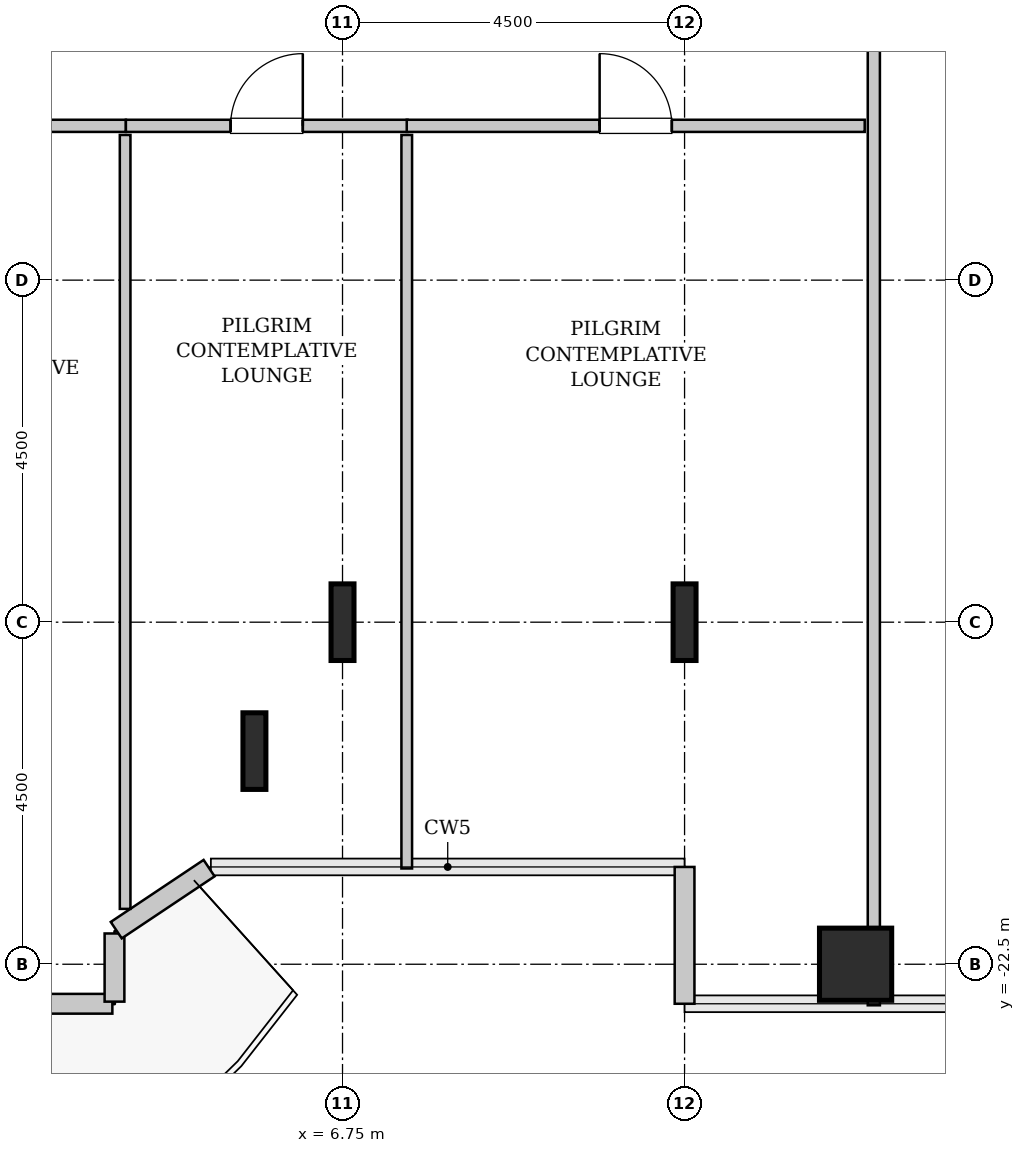
"""IFC4 building model, lengths in metres.
Left out: names, types, materials, properties, quantities, classifications, styles, units other than length and angle.
Written with IfcOpenShell. Run it as: python <this file> out.ifc"""

import sys

from ifc_helpers import new_model, si_unit, direction, frame, frame_2d, origin, origin_2d, place, context, subcontext, project, spatial, rectangle, hollow_rectangle, i_section, extrude, source, transform, mapped, element, fill, save


model = new_model("IFC4")
c1 = context("Model", 3, precision=1e-05, world=origin(), true_north=direction((0.0, 1.0)))
c2 = subcontext(c1, "Body", "Model", "MODEL_VIEW")
j1 = project(units=[si_unit("LENGTHUNIT", "METRE"), si_unit("PLANEANGLEUNIT", "RADIAN")], contexts=[c1])
p1 = place(None, origin())
s1 = spatial("IfcSite", under=j1, at=p1, CompositionType="ELEMENT")
p2 = place(p1, origin())
s2 = spatial("IfcBuilding", under=s1, at=p2, CompositionType="ELEMENT")
p3 = place(p2, frame((0.0, 0.0, 44.4)))
s3 = spatial("IfcBuildingStorey", under=s2, at=p3, CompositionType="ELEMENT", Elevation=44.4)
m1 = source(origin(), c2, "Body", "SweptSolid", [
    extrude(i_section(OverallWidth=0.302, OverallDepth=1.008, WebThickness=0.021, FlangeThickness=0.04, FilletRadius=0.03, at=origin_2d()), origin(), (0.0, 0.0, 1.0), 3.8),
])
for number, where, z_axis, x_axis in (
    (1, (5.591, -19.696, 0.0), (0.0, 0.0, 1.0), (1.0, 0.0, 0.0)),
    (2, (6.75, -18.0, 0.0), (0.0, 0.0, 1.0), (1.0, 0.0, 0.0)),
    (3, (11.25, -18.0, 0.0), (0.0, 0.0, 1.0), (1.0, 0.0, 0.0)),
):
    element("IfcColumn", number, at=place(p3, frame(where, z_axis=z_axis, x_axis=x_axis)), inside=s3, PredefinedType="COLUMN", context=c2, shape_type="MappedRepresentation", body=[
        mapped(m1, transform((0.0, 0.0, 0.0), x_axis=(1.0, 0.0, 0.0), y_axis=(0.0, 1.0, 0.0), z_axis=(0.0, 0.0, 1.0), scale=1.0)),
    ])
m2 = source(origin(), c2, "Body", "SweptSolid", [
    extrude(hollow_rectangle(XDim=0.95, YDim=0.95, WallThickness=0.045, InnerFilletRadius=0.045, OuterFilletRadius=0.09, at=origin_2d()), origin(), (0.0, 0.0, 1.0), 3.8),
])
p4 = place(p3, frame((13.5, -22.5, 0.0), z_axis=(0.0, 0.0, 1.0), x_axis=(1.0, 0.0, 0.0)))
e4 = element("IfcColumn", 4, at=p4, inside=s3, PredefinedType="COLUMN", context=c2, shape_type="MappedRepresentation", body=[
    mapped(m2, transform((0.0, 0.0, 0.0), x_axis=(1.0, 0.0, 0.0), y_axis=(0.0, 1.0, 0.0), z_axis=(0.0, 0.0, 1.0), scale=1.0)),
])
m3 = source(origin(), c2, "Body", "SweptSolid", [
    extrude(rectangle(XDim=1.8, YDim=0.26, at=frame_2d((0.9, 0.0))), origin(), (0.0, 0.0, 1.0), 3.55),
])
p5 = place(p3, frame((11.25, -21.22, 0.0), z_axis=(0.0, 0.0, 1.0), x_axis=(0.0, -1.0, 0.0)))
e5 = element("IfcWall", 5, at=p5, inside=s3, PredefinedType="SOLIDWALL", context=c2, shape_type="MappedRepresentation", body=[
    mapped(m3, transform((0.0, 0.0, 0.0), x_axis=(1.0, 0.0, 0.0), y_axis=(0.0, 1.0, 0.0), z_axis=(0.0, 0.0, 1.0), scale=1.0)),
])
m4 = source(origin(), c2, "Body", "SweptSolid", [
    extrude(rectangle(XDim=1.37, YDim=0.26, at=frame_2d((0.685, 0.0))), origin(), (0.0, 0.0, 1.0), 3.55),
])
p6 = place(p3, frame((2.352, -23.02, 0.0), z_axis=(0.0, 0.0, 1.0), x_axis=(1.0, 0.0, 0.0)))
e6 = element("IfcWall", 6, at=p6, inside=s3, PredefinedType="SOLIDWALL", context=c2, shape_type="MappedRepresentation", body=[
    mapped(m4, transform((0.0, 0.0, 0.0), x_axis=(1.0, 0.0, 0.0), y_axis=(0.0, 1.0, 0.0), z_axis=(0.0, 0.0, 1.0), scale=1.0)),
])
m5 = source(origin(), c2, "Body", "SweptSolid", [
    extrude(rectangle(XDim=0.897, YDim=0.26, at=frame_2d((0.448, 0.0))), origin(), (0.0, 0.0, 1.0), 3.55),
])
p7 = place(p3, frame((3.75, -22.992, 0.0), z_axis=(0.0, 0.0, 1.0), x_axis=(0.0, 1.0, 0.0)))
e7 = element("IfcWall", 7, at=p7, inside=s3, PredefinedType="SOLIDWALL", context=c2, shape_type="MappedRepresentation", body=[
    mapped(m5, transform((0.0, 0.0, 0.0), x_axis=(1.0, 0.0, 0.0), y_axis=(0.0, 1.0, 0.0), z_axis=(0.0, 0.0, 1.0), scale=1.0)),
])
m6 = source(origin(), c2, "Body", "SweptSolid", [
    extrude(rectangle(XDim=1.469, YDim=0.26, at=frame_2d((0.734, 0.0))), origin(), (0.0, 0.0, 1.0), 3.55),
])
p8 = place(p3, frame((3.773, -22.052, 0.0), z_axis=(0.0, 0.0, 1.0), x_axis=(0.831461760506, 0.555581983884, 0.0)))
e8 = element("IfcWall", 8, at=p8, inside=s3, PredefinedType="SOLIDWALL", context=c2, shape_type="MappedRepresentation", body=[
    mapped(m6, transform((0.0, 0.0, 0.0), x_axis=(1.0, 0.0, 0.0), y_axis=(0.0, 1.0, 0.0), z_axis=(0.0, 0.0, 1.0), scale=1.0)),
])
m7 = source(origin(), c2, "Body", "SweptSolid", [
    extrude(rectangle(XDim=15.845, YDim=0.16, at=frame_2d((7.922, 0.0))), origin(), (0.0, 0.0, 1.0), 3.535),
])
p9 = place(p3, frame((13.74, -23.04, 0.0), z_axis=(0.0, 0.0, 1.0), x_axis=(0.0, 1.0, 0.0)))
e9 = element("IfcWall", 9, at=p9, inside=s3, PredefinedType="PARTITIONING", context=c2, shape_type="MappedRepresentation", body=[
    mapped(m7, transform((0.0, 0.0, 0.0), x_axis=(1.0, 0.0, 0.0), y_axis=(0.0, 1.0, 0.0), z_axis=(0.0, 0.0, 1.0), scale=1.0)),
])
p10 = place(p9, frame((13.212, 0.0, 0.0)))
e10 = element("IfcOpeningElement", 10, at=p10, cuts=e9, PredefinedType="OPENING", context=c2, shape_type="SweptSolid", body=[
    extrude(rectangle(XDim=0.95, YDim=2.1, at=frame_2d((0.475, 1.05))), frame((0.0, 0.09, 0.0), z_axis=(0.0, -1.0, 0.0), x_axis=(1.0, 0.0, 0.0)), (0.0, 0.0, 1.0), 0.18),
])
m8 = source(origin(), c2, "Body", "SweptSolid", [
    extrude(rectangle(XDim=3.705, YDim=0.16, at=frame_2d((1.853, 0.0))), origin(), (0.0, 0.0, 1.0), 3.535),
])
p11 = place(p3, frame((0.195, -11.47, 0.0), z_axis=(0.0, 0.0, 1.0), x_axis=(1.0, 0.0, 0.0)))
e11 = element("IfcWall", 11, at=p11, inside=s3, PredefinedType="PARTITIONING", context=c2, shape_type="MappedRepresentation", body=[
    mapped(m8, transform((0.0, 0.0, 0.0), x_axis=(1.0, 0.0, 0.0), y_axis=(0.0, 1.0, 0.0), z_axis=(0.0, 0.0, 1.0), scale=1.0)),
])
p12 = place(p11, frame((1.377, 0.0, 0.0)))
e12 = element("IfcOpeningElement", 12, at=p12, cuts=e11, PredefinedType="OPENING", context=c2, shape_type="SweptSolid", body=[
    extrude(rectangle(XDim=0.95, YDim=2.1, at=frame_2d((0.475, 1.05))), frame((0.0, 0.09, 0.0), z_axis=(0.0, -1.0, 0.0), x_axis=(1.0, 0.0, 0.0)), (0.0, 0.0, 1.0), 0.18),
])
m9 = source(origin(), c2, "Body", "SweptSolid", [
    extrude(rectangle(XDim=10.182, YDim=0.14, at=frame_2d((5.091, 0.0))), origin(), (0.0, 0.0, 1.0), 3.535),
])
p13 = place(p3, frame((3.89, -21.772, 0.0), z_axis=(0.0, 0.0, 1.0), x_axis=(0.0, 1.0, 0.0)))
e13 = element("IfcWall", 13, at=p13, inside=s3, PredefinedType="PARTITIONING", context=c2, shape_type="MappedRepresentation", body=[
    mapped(m9, transform((0.0, 0.0, 0.0), x_axis=(1.0, 0.0, 0.0), y_axis=(0.0, 1.0, 0.0), z_axis=(0.0, 0.0, 1.0), scale=1.0)),
])
m10 = source(origin(), c2, "Body", "SweptSolid", [
    extrude(rectangle(XDim=3.705, YDim=0.16, at=frame_2d((1.853, 0.0))), origin(), (0.0, 0.0, 1.0), 3.535),
])
p14 = place(p3, frame((3.9, -11.47, 0.0), z_axis=(0.0, 0.0, 1.0), x_axis=(1.0, 0.0, 0.0)))
e14 = element("IfcWall", 14, at=p14, inside=s3, PredefinedType="PARTITIONING", context=c2, shape_type="MappedRepresentation", body=[
    mapped(m10, transform((0.0, 0.0, 0.0), x_axis=(1.0, 0.0, 0.0), y_axis=(0.0, 1.0, 0.0), z_axis=(0.0, 0.0, 1.0), scale=1.0)),
])
p15 = place(p14, frame((1.377, 0.0, 0.0)))
e15 = element("IfcOpeningElement", 15, at=p15, cuts=e14, PredefinedType="OPENING", context=c2, shape_type="SweptSolid", body=[
    extrude(rectangle(XDim=0.95, YDim=2.1, at=frame_2d((0.475, 1.05))), frame((0.0, 0.09, 0.0), z_axis=(0.0, -1.0, 0.0), x_axis=(1.0, 0.0, 0.0)), (0.0, 0.0, 1.0), 0.18),
])
m11 = source(origin(), c2, "Body", "SweptSolid", [
    extrude(rectangle(XDim=9.65, YDim=0.14, at=frame_2d((4.825, 0.0))), origin(), (0.0, 0.0, 1.0), 3.535),
])
p16 = place(p3, frame((7.595, -21.24, 0.0), z_axis=(0.0, 0.0, 1.0), x_axis=(0.0, 1.0, 0.0)))
e16 = element("IfcWall", 16, at=p16, inside=s3, PredefinedType="PARTITIONING", context=c2, shape_type="MappedRepresentation", body=[
    mapped(m11, transform((0.0, 0.0, 0.0), x_axis=(1.0, 0.0, 0.0), y_axis=(0.0, 1.0, 0.0), z_axis=(0.0, 0.0, 1.0), scale=1.0)),
])
m12 = source(origin(), c2, "Body", "SweptSolid", [
    extrude(rectangle(XDim=6.025, YDim=0.16, at=frame_2d((3.013, 0.0))), origin(), (0.0, 0.0, 1.0), 3.535),
])
p17 = place(p3, frame((7.595, -11.47, 0.0), z_axis=(0.0, 0.0, 1.0), x_axis=(1.0, 0.0, 0.0)))
e17 = element("IfcWall", 17, at=p17, inside=s3, PredefinedType="PARTITIONING", context=c2, shape_type="MappedRepresentation", body=[
    mapped(m12, transform((0.0, 0.0, 0.0), x_axis=(1.0, 0.0, 0.0), y_axis=(0.0, 1.0, 0.0), z_axis=(0.0, 0.0, 1.0), scale=1.0)),
])
p18 = place(p17, frame((2.538, 0.0, 0.0)))
e18 = element("IfcOpeningElement", 18, at=p18, cuts=e17, PredefinedType="OPENING", context=c2, shape_type="SweptSolid", body=[
    extrude(rectangle(XDim=0.95, YDim=2.1, at=frame_2d((0.475, 1.05))), frame((0.0, 0.09, 0.0), z_axis=(0.0, -1.0, 0.0), x_axis=(1.0, 0.0, 0.0)), (0.0, 0.0, 1.0), 0.18),
])
m13 = source(origin(), c2, "Body", "SweptSolid", [
    extrude(rectangle(XDim=0.95, YDim=2.1, at=frame_2d((0.475, 1.05))), frame((0.0, 0.025, 0.0), z_axis=(0.0, -1.0, 0.0), x_axis=(1.0, 0.0, 0.0)), (0.0, 0.0, 1.0), 0.05),
])
p19 = place(p15, origin())
e19 = element("IfcDoor", 19, at=p19, inside=s3, OperationType="SINGLE_SWING_RIGHT", PredefinedType="DOOR", context=c2, shape_type="MappedRepresentation", body=[
    mapped(m13, transform((0.0, 0.0, 0.0), x_axis=(1.0, 0.0, 0.0), y_axis=(0.0, 1.0, 0.0), z_axis=(0.0, 0.0, 1.0), scale=1.0)),
])
fill(e15, e19)
p20 = place(p18, origin())
e20 = element("IfcDoor", 20, at=p20, inside=s3, OperationType="SINGLE_SWING_LEFT", PredefinedType="DOOR", context=c2, shape_type="MappedRepresentation", body=[
    mapped(m13, transform((0.0, 0.0, 0.0), x_axis=(1.0, 0.0, 0.0), y_axis=(0.0, 1.0, 0.0), z_axis=(0.0, 0.0, 1.0), scale=1.0)),
])
fill(e18, e20)
save(model, sys.argv[1])
